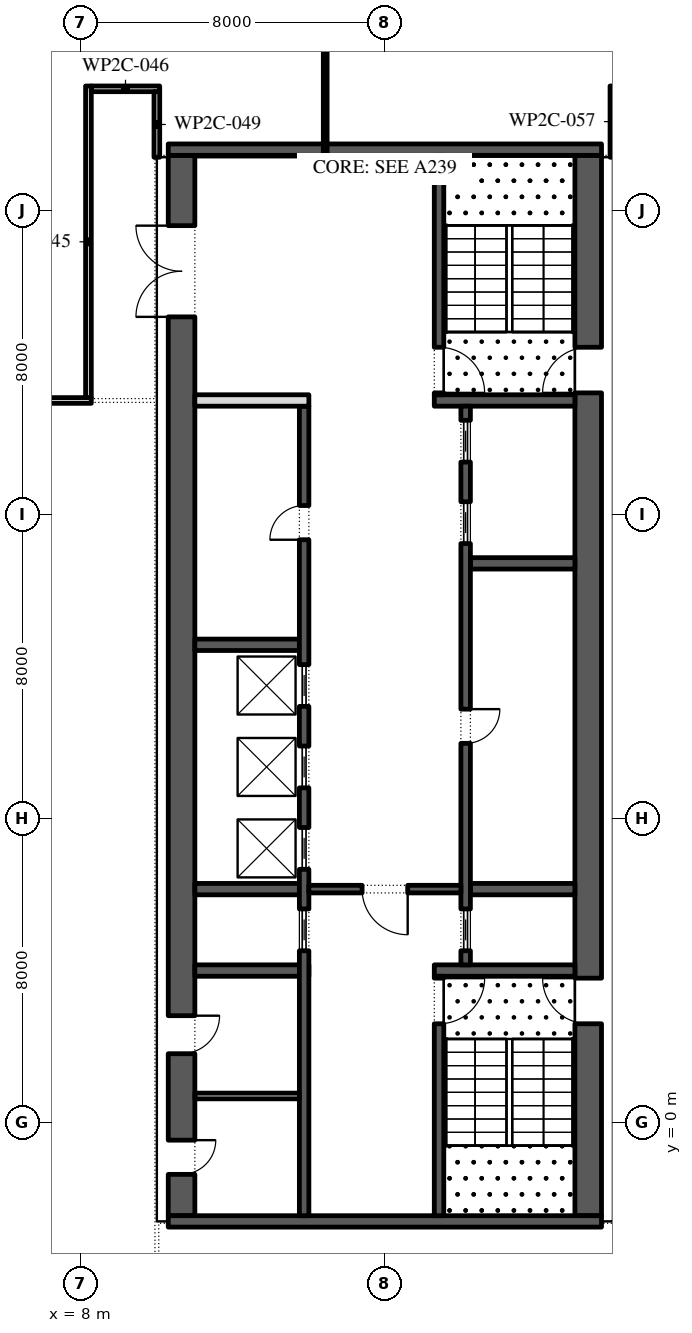
"""IFC4 building model, lengths in metres.
Left out: names, types, materials, properties, quantities, classifications, styles, units other than length and angle.
Written with IfcOpenShell. Run it as: python <this file> out.ifc"""

import sys

from ifc_helpers import new_model, si_unit, direction, frame, frame_2d, origin, place, context, subcontext, project, spatial, rectangle, extrude, element, fill, save


model = new_model("IFC4")
c1 = context("Model", 3, precision=1e-05, world=origin(), true_north=direction((0.0, 1.0)))
c2 = subcontext(c1, "Body", "Model", "MODEL_VIEW")
j1 = project(units=[si_unit("LENGTHUNIT", "METRE"), si_unit("PLANEANGLEUNIT", "RADIAN")], contexts=[c1])
p1 = place(None, origin())
s1 = spatial("IfcSite", under=j1, at=p1, CompositionType="ELEMENT")
p2 = place(p1, origin())
s2 = spatial("IfcBuilding", under=s1, at=p2, CompositionType="ELEMENT")
p3 = place(p2, frame((0.0, 0.0, 165.6)))
s3 = spatial("IfcBuildingStorey", under=s2, at=p3, CompositionType="ELEMENT", Elevation=165.6)
p4 = place(p3, frame((21.35, -2.45, 0.0), z_axis=(0.0, 0.0, 1.0), x_axis=(0.0, 1.0, 0.0)))
e1 = element("IfcWall", 1, at=p4, inside=s3, PredefinedType="SHEAR", context=c2, shape_type="SweptSolid", body=[
    extrude(rectangle(XDim=27.9, YDim=0.7, at=frame_2d((13.95, 0.0))), origin(), (0.0, 0.0, 1.0), 5.8),
])
p5 = place(p4, frame((5.05, 0.0, 0.0)))
e2 = element("IfcOpeningElement", 2, at=p5, cuts=e1, PredefinedType="OPENING", context=c2, shape_type="SweptSolid", body=[
    extrude(rectangle(XDim=1.2, YDim=2.1, at=frame_2d((0.6, 1.05))), frame((0.0, 0.36, 0.0), z_axis=(0.0, -1.0, 0.0), x_axis=(1.0, 0.0, 0.0)), (0.0, 0.0, 1.0), 0.72),
])
p6 = place(p4, frame((21.65, 0.0, 0.0)))
e3 = element("IfcOpeningElement", 3, at=p6, cuts=e1, PredefinedType="OPENING", context=c2, shape_type="SweptSolid", body=[
    extrude(rectangle(XDim=1.2, YDim=2.1, at=frame_2d((0.6, 1.05))), frame((0.0, 0.36, 0.0), z_axis=(0.0, -1.0, 0.0), x_axis=(1.0, 0.0, 0.0)), (0.0, 0.0, 1.0), 0.72),
])
p7 = place(p3, frame((10.65, -2.45, 0.0), z_axis=(0.0, 0.0, 1.0), x_axis=(0.0, 1.0, 0.0)))
e4 = element("IfcWall", 4, at=p7, inside=s3, PredefinedType="SHEAR", context=c2, shape_type="SweptSolid", body=[
    extrude(rectangle(XDim=27.9, YDim=0.7, at=frame_2d((13.95, 0.0))), origin(), (0.0, 0.0, 1.0), 5.8),
])
p8 = place(p7, frame((23.65, 0.0, 0.0)))
e5 = element("IfcOpeningElement", 5, at=p8, cuts=e4, PredefinedType="OPENING", context=c2, shape_type="SweptSolid", body=[
    extrude(rectangle(XDim=2.4, YDim=2.1, at=frame_2d((1.2, 1.05))), frame((0.0, 0.36, 0.0), z_axis=(0.0, -1.0, 0.0), x_axis=(1.0, 0.0, 0.0)), (0.0, 0.0, 1.0), 0.72),
])
p9 = place(p7, frame((1.087, 0.0, 0.0)))
e6 = element("IfcOpeningElement", 6, at=p9, cuts=e4, PredefinedType="OPENING", context=c2, shape_type="SweptSolid", body=[
    extrude(rectangle(XDim=0.9, YDim=2.1, at=frame_2d((0.45, 1.05))), frame((0.0, 0.36, 0.0), z_axis=(0.0, -1.0, 0.0), x_axis=(1.0, 0.0, 0.0)), (0.0, 0.0, 1.0), 0.72),
])
p10 = place(p7, frame((4.262, 0.0, 0.0)))
e7 = element("IfcOpeningElement", 7, at=p10, cuts=e4, PredefinedType="OPENING", context=c2, shape_type="SweptSolid", body=[
    extrude(rectangle(XDim=1.0, YDim=2.1, at=frame_2d((0.5, 1.05))), frame((0.0, 0.36, 0.0), z_axis=(0.0, -1.0, 0.0), x_axis=(1.0, 0.0, 0.0)), (0.0, 0.0, 1.0), 0.72),
])
for number, where, z_axis, x_axis in (
    (8, (10.3, -2.6, 0.0), (0.0, 0.0, 1.0), (1.0, 0.0, 0.0)),
    (9, (10.3, 25.6, 0.0), (0.0, 0.0, 1.0), (1.0, 0.0, 0.0)),
):
    element("IfcWall", number, at=place(p3, frame(where, z_axis=z_axis, x_axis=x_axis)), inside=s3, PredefinedType="SHEAR", context=c2, shape_type="SweptSolid", body=[
        extrude(rectangle(XDim=11.4, YDim=0.3, at=frame_2d((5.7, 0.0))), origin(), (0.0, 0.0, 1.0), 5.8),
    ])
p11 = place(p3, frame((17.3, 4.0, 0.0), z_axis=(0.0, 0.0, 1.0), x_axis=(1.0, 0.0, 0.0)))
e10 = element("IfcWall", 10, at=p11, inside=s3, PredefinedType="SHEAR", context=c2, shape_type="SweptSolid", body=[
    extrude(rectangle(XDim=3.7, YDim=0.3, at=frame_2d((1.85, 0.0))), origin(), (0.0, 0.0, 1.0), 5.8),
])
p12 = place(p3, frame((17.425, -2.45, 0.0), z_axis=(0.0, 0.0, 1.0), x_axis=(0.0, 1.0, 0.0)))
e11 = element("IfcWall", 11, at=p12, inside=s3, PredefinedType="SHEAR", context=c2, shape_type="SweptSolid", body=[
    extrude(rectangle(XDim=6.3, YDim=0.25, at=frame_2d((3.15, 0.0))), origin(), (0.0, 0.0, 1.0), 5.8),
])
p13 = place(p12, frame((5.05, 0.0, 0.0)))
e12 = element("IfcOpeningElement", 12, at=p13, cuts=e11, PredefinedType="OPENING", context=c2, shape_type="SweptSolid", body=[
    extrude(rectangle(XDim=1.2, YDim=2.1, at=frame_2d((0.6, 1.05))), frame((0.0, 0.135, 0.0), z_axis=(0.0, -1.0, 0.0), x_axis=(1.0, 0.0, 0.0)), (0.0, 0.0, 1.0), 0.27),
])
p14 = place(p3, frame((17.3, 19.0, 0.0), z_axis=(0.0, 0.0, 1.0), x_axis=(1.0, 0.0, 0.0)))
e13 = element("IfcWall", 13, at=p14, inside=s3, PredefinedType="SHEAR", context=c2, shape_type="SweptSolid", body=[
    extrude(rectangle(XDim=3.7, YDim=0.3, at=frame_2d((1.85, 0.0))), origin(), (0.0, 0.0, 1.0), 5.8),
])
p15 = place(p3, frame((17.425, 19.15, 0.0), z_axis=(0.0, 0.0, 1.0), x_axis=(0.0, 1.0, 0.0)))
e14 = element("IfcWall", 14, at=p15, inside=s3, PredefinedType="SHEAR", context=c2, shape_type="SweptSolid", body=[
    extrude(rectangle(XDim=6.3, YDim=0.25, at=frame_2d((3.15, 0.0))), origin(), (0.0, 0.0, 1.0), 5.8),
])
p16 = place(p15, frame((0.05, 0.0, 0.0)))
e15 = element("IfcOpeningElement", 15, at=p16, cuts=e14, PredefinedType="OPENING", context=c2, shape_type="SweptSolid", body=[
    extrude(rectangle(XDim=1.2, YDim=2.1, at=frame_2d((0.6, 1.05))), frame((0.0, 0.135, 0.0), z_axis=(0.0, -1.0, 0.0), x_axis=(1.0, 0.0, 0.0)), (0.0, 0.0, 1.0), 0.27),
])
for number, where, z_axis, x_axis in (
    (16, (18.25, 6.143, 0.0), (0.0, 0.0, 1.0), (1.0, 0.0, 0.0)),
    (17, (18.25, 14.714, 0.0), (0.0, 0.0, 1.0), (1.0, 0.0, 0.0)),
):
    element("IfcWall", number, at=place(p3, frame(where, z_axis=z_axis, x_axis=x_axis)), inside=s3, PredefinedType="SHEAR", context=c2, shape_type="SweptSolid", body=[
        extrude(rectangle(XDim=2.75, YDim=0.3, at=frame_2d((1.375, 0.0))), origin(), (0.0, 0.0, 1.0), 5.8),
    ])
p17 = place(p3, frame((18.125, 4.15, 0.0), z_axis=(0.0, 0.0, 1.0), x_axis=(0.0, 1.0, 0.0)))
e18 = element("IfcWall", 18, at=p17, inside=s3, PredefinedType="SHEAR", context=c2, shape_type="SweptSolid", body=[
    extrude(rectangle(XDim=14.7, YDim=0.25, at=frame_2d((7.35, 0.0))), origin(), (0.0, 0.0, 1.0), 5.8),
])
p18 = place(p17, frame((5.829, 0.0, 0.0)))
e19 = element("IfcOpeningElement", 19, at=p18, cuts=e18, PredefinedType="OPENING", context=c2, shape_type="SweptSolid", body=[
    extrude(rectangle(XDim=0.9, YDim=2.1, at=frame_2d((0.45, 1.05))), frame((0.0, 0.135, 0.0), z_axis=(0.0, -1.0, 0.0), x_axis=(1.0, 0.0, 0.0)), (0.0, 0.0, 1.0), 0.27),
])
p19 = place(p17, frame((0.371, 0.0, 0.0)))
e20 = element("IfcOpeningElement", 20, at=p19, cuts=e18, PredefinedType="OPENING", context=c2, shape_type="SweptSolid", body=[
    extrude(rectangle(XDim=1.1, YDim=2.1, at=frame_2d((0.55, 1.05))), frame((0.0, 0.135, 0.0), z_axis=(0.0, -1.0, 0.0), x_axis=(1.0, 0.0, 0.0)), (0.0, 0.0, 1.0), 0.27),
])
p20 = place(p17, frame((11.086, 0.0, 0.0)))
e21 = element("IfcOpeningElement", 21, at=p20, cuts=e18, PredefinedType="OPENING", context=c2, shape_type="SweptSolid", body=[
    extrude(rectangle(XDim=1.1, YDim=2.1, at=frame_2d((0.55, 1.05))), frame((0.0, 0.135, 0.0), z_axis=(0.0, -1.0, 0.0), x_axis=(1.0, 0.0, 0.0)), (0.0, 0.0, 1.0), 0.27),
])
p21 = place(p17, frame((13.229, 0.0, 0.0)))
e22 = element("IfcOpeningElement", 22, at=p21, cuts=e18, PredefinedType="OPENING", context=c2, shape_type="SweptSolid", body=[
    extrude(rectangle(XDim=1.1, YDim=2.1, at=frame_2d((0.55, 1.05))), frame((0.0, 0.135, 0.0), z_axis=(0.0, -1.0, 0.0), x_axis=(1.0, 0.0, 0.0)), (0.0, 0.0, 1.0), 0.27),
])
p22 = place(p3, frame((11.0, 4.0, 0.0), z_axis=(0.0, 0.0, 1.0), x_axis=(1.0, 0.0, 0.0)))
e23 = element("IfcWall", 23, at=p22, inside=s3, PredefinedType="SHEAR", context=c2, shape_type="SweptSolid", body=[
    extrude(rectangle(XDim=3.0, YDim=0.3, at=frame_2d((1.5, 0.0))), origin(), (0.0, 0.0, 1.0), 5.8),
])
for number, where, z_axis, x_axis in (
    (24, (11.0, 6.143, 0.0), (0.0, 0.0, 1.0), (1.0, 0.0, 0.0)),
    (25, (11.0, 12.571, 0.0), (0.0, 0.0, 1.0), (1.0, 0.0, 0.0)),
):
    element("IfcWall", number, at=place(p3, frame(where, z_axis=z_axis, x_axis=x_axis)), inside=s3, PredefinedType="SHEAR", context=c2, shape_type="SweptSolid", body=[
        extrude(rectangle(XDim=2.75, YDim=0.3, at=frame_2d((1.375, 0.0))), origin(), (0.0, 0.0, 1.0), 5.8),
    ])
p23 = place(p3, frame((13.875, -2.45, 0.0), z_axis=(0.0, 0.0, 1.0), x_axis=(0.0, 1.0, 0.0)))
e26 = element("IfcWall", 26, at=p23, inside=s3, PredefinedType="SHEAR", context=c2, shape_type="SweptSolid", body=[
    extrude(rectangle(XDim=21.3, YDim=0.25, at=frame_2d((10.65, 0.0))), origin(), (0.0, 0.0, 1.0), 5.8),
])
p24 = place(p23, frame((17.786, 0.0, 0.0)))
e27 = element("IfcOpeningElement", 27, at=p24, cuts=e26, PredefinedType="OPENING", context=c2, shape_type="SweptSolid", body=[
    extrude(rectangle(XDim=0.9, YDim=2.1, at=frame_2d((0.45, 1.05))), frame((0.0, 0.135, 0.0), z_axis=(0.0, -1.0, 0.0), x_axis=(1.0, 0.0, 0.0)), (0.0, 0.0, 1.0), 0.27),
])
p25 = place(p23, frame((6.971, 0.0, 0.0)))
e28 = element("IfcOpeningElement", 28, at=p25, cuts=e26, PredefinedType="OPENING", context=c2, shape_type="SweptSolid", body=[
    extrude(rectangle(XDim=1.1, YDim=2.1, at=frame_2d((0.55, 1.05))), frame((0.0, 0.135, 0.0), z_axis=(0.0, -1.0, 0.0), x_axis=(1.0, 0.0, 0.0)), (0.0, 0.0, 1.0), 0.27),
])
p26 = place(p23, frame((9.114, 0.0, 0.0)))
e29 = element("IfcOpeningElement", 29, at=p26, cuts=e26, PredefinedType="OPENING", context=c2, shape_type="SweptSolid", body=[
    extrude(rectangle(XDim=1.1, YDim=2.1, at=frame_2d((0.55, 1.05))), frame((0.0, 0.135, 0.0), z_axis=(0.0, -1.0, 0.0), x_axis=(1.0, 0.0, 0.0)), (0.0, 0.0, 1.0), 0.27),
])
p27 = place(p23, frame((11.257, 0.0, 0.0)))
e30 = element("IfcOpeningElement", 30, at=p27, cuts=e26, PredefinedType="OPENING", context=c2, shape_type="SweptSolid", body=[
    extrude(rectangle(XDim=1.1, YDim=2.1, at=frame_2d((0.55, 1.05))), frame((0.0, 0.135, 0.0), z_axis=(0.0, -1.0, 0.0), x_axis=(1.0, 0.0, 0.0)), (0.0, 0.0, 1.0), 0.27),
])
p28 = place(p23, frame((13.4, 0.0, 0.0)))
e31 = element("IfcOpeningElement", 31, at=p28, cuts=e26, PredefinedType="OPENING", context=c2, shape_type="SweptSolid", body=[
    extrude(rectangle(XDim=1.1, YDim=2.1, at=frame_2d((0.55, 1.05))), frame((0.0, 0.135, 0.0), z_axis=(0.0, -1.0, 0.0), x_axis=(1.0, 0.0, 0.0)), (0.0, 0.0, 1.0), 0.27),
])
p29 = place(p3, frame((11.0, 19.0, 0.0), z_axis=(0.0, 0.0, 1.0), x_axis=(1.0, 0.0, 0.0)))
e32 = element("IfcWall", 32, at=p29, inside=s3, PredefinedType="PARTITIONING", context=c2, shape_type="SweptSolid", body=[
    extrude(rectangle(XDim=3.0, YDim=0.3, at=frame_2d((1.5, 0.0))), origin(), (0.0, 0.0, 1.0), 5.8),
])
p30 = place(p3, frame((14.0, 6.143, 0.0), z_axis=(0.0, 0.0, 1.0), x_axis=(1.0, 0.0, 0.0)))
e33 = element("IfcWall", 33, at=p30, inside=s3, PredefinedType="SHEAR", context=c2, shape_type="SweptSolid", body=[
    extrude(rectangle(XDim=4.0, YDim=0.2, at=frame_2d((2.0, 0.0))), origin(), (0.0, 0.0, 1.0), 5.8),
])
p31 = place(p30, frame((1.4, 0.0, 0.0)))
e34 = element("IfcOpeningElement", 34, at=p31, cuts=e33, PredefinedType="OPENING", context=c2, shape_type="SweptSolid", body=[
    extrude(rectangle(XDim=1.2, YDim=2.1, at=frame_2d((0.6, 1.05))), frame((0.0, 0.11, 0.0), z_axis=(0.0, -1.0, 0.0), x_axis=(1.0, 0.0, 0.0)), (0.0, 0.0, 1.0), 0.22),
])
p32 = place(p3, frame((11.0, 0.7, 0.0), z_axis=(0.0, 0.0, 1.0), x_axis=(1.0, 0.0, 0.0)))
e35 = element("IfcWall", 35, at=p32, inside=s3, PredefinedType="PARTITIONING", context=c2, shape_type="SweptSolid", body=[
    extrude(rectangle(XDim=2.75, YDim=0.15, at=frame_2d((1.375, 0.0))), origin(), (0.0, 0.0, 1.0), 5.8),
])
p33 = place(p3, frame((0.915, 19.0, 0.0), z_axis=(0.0, 0.0, 1.0), x_axis=(1.0, 0.0, 0.0)))
e36 = element("IfcWall", 36, at=p33, inside=s3, PredefinedType="PARTITIONING", context=c2, shape_type="SweptSolid", body=[
    extrude(rectangle(XDim=7.36, YDim=0.15, at=frame_2d((3.68, 0.0))), origin(), (0.0, 0.0, 1.0), 5.8),
])
p34 = place(p3, frame((8.2, 19.075, 0.0), z_axis=(0.0, 0.0, 1.0), x_axis=(0.0, 1.0, 0.0)))
e37 = element("IfcWall", 37, at=p34, inside=s3, PredefinedType="PARTITIONING", context=c2, shape_type="SweptSolid", body=[
    extrude(rectangle(XDim=8.2, YDim=0.15, at=frame_2d((4.1, 0.0))), origin(), (0.0, 0.0, 1.0), 5.8),
])
p35 = place(p3, frame((8.275, 27.2, 0.0), z_axis=(0.0, 0.0, 1.0), x_axis=(1.0, 0.0, 0.0)))
e38 = element("IfcWall", 38, at=p35, inside=s3, PredefinedType="PARTITIONING", context=c2, shape_type="SweptSolid", body=[
    extrude(rectangle(XDim=1.8, YDim=0.15, at=frame_2d((0.9, 0.0))), origin(), (0.0, 0.0, 1.0), 5.8),
])
p36 = place(p3, frame((10.0, 27.125, 0.0), z_axis=(0.0, 0.0, 1.0), x_axis=(0.0, -1.0, 0.0)))
e39 = element("IfcWall", 39, at=p36, inside=s3, PredefinedType="PARTITIONING", context=c2, shape_type="SweptSolid", body=[
    extrude(rectangle(XDim=1.725, YDim=0.15, at=frame_2d((0.863, 0.0))), origin(), (0.0, 0.0, 1.0), 5.8),
])
p37 = place(p3, frame((14.43, 31.45, 0.0), z_axis=(0.0, 0.0, 1.0), x_axis=(0.0, -1.0, 0.0)))
e40 = element("IfcWall", 40, at=p37, inside=s3, PredefinedType="PARTITIONING", context=c2, shape_type="SweptSolid", body=[
    extrude(rectangle(XDim=6.05, YDim=0.1, at=frame_2d((3.025, 0.0))), origin(), (0.0, 0.0, 1.0), 5.8),
])
p38 = place(p3, frame((22.0, 25.4, 0.0), z_axis=(0.0, 0.0, 1.0), x_axis=(0.0, 1.0, 0.0)))
e41 = element("IfcWall", 41, at=p38, inside=s3, PredefinedType="PARTITIONING", context=c2, shape_type="SweptSolid", body=[
    extrude(rectangle(XDim=1.875, YDim=0.15, at=frame_2d((0.938, 0.0))), origin(), (0.0, 0.0, 1.0), 5.8),
])
p39 = place(p18, frame((0.9, -0.2, 0.0), z_axis=(0.0, 0.0, 1.0), x_axis=(-1.0, 0.0, 0.0)))
e42 = element("IfcDoor", 42, at=p39, inside=s3, OperationType="SINGLE_SWING_RIGHT", PredefinedType="DOOR", context=c2, shape_type="SweptSolid", body=[
    extrude(rectangle(XDim=0.9, YDim=2.1, at=frame_2d((0.45, 1.05))), frame((0.0, -0.075, 0.0), z_axis=(0.0, -1.0, 0.0), x_axis=(1.0, 0.0, 0.0)), (0.0, 0.0, 1.0), 0.05),
])
fill(e19, e42)
p40 = place(p19, origin())
e43 = element("IfcDoor", 43, at=p40, inside=s3, OperationType="SLIDING_TO_LEFT", PredefinedType="DOOR", context=c2, shape_type="SweptSolid", body=[
    extrude(rectangle(XDim=1.1, YDim=2.1, at=frame_2d((0.55, 1.05))), frame((0.0, 0.025, 0.0), z_axis=(0.0, -1.0, 0.0), x_axis=(1.0, 0.0, 0.0)), (0.0, 0.0, 1.0), 0.05),
])
fill(e20, e43)
p41 = place(p20, origin())
e44 = element("IfcDoor", 44, at=p41, inside=s3, OperationType="SLIDING_TO_LEFT", PredefinedType="DOOR", context=c2, shape_type="SweptSolid", body=[
    extrude(rectangle(XDim=1.1, YDim=2.1, at=frame_2d((0.55, 1.05))), frame((0.0, 0.025, 0.0), z_axis=(0.0, -1.0, 0.0), x_axis=(1.0, 0.0, 0.0)), (0.0, 0.0, 1.0), 0.05),
])
fill(e21, e44)
p42 = place(p21, origin())
e45 = element("IfcDoor", 45, at=p42, inside=s3, OperationType="SLIDING_TO_LEFT", PredefinedType="DOOR", context=c2, shape_type="SweptSolid", body=[
    extrude(rectangle(XDim=1.1, YDim=2.1, at=frame_2d((0.55, 1.05))), frame((0.0, 0.025, 0.0), z_axis=(0.0, -1.0, 0.0), x_axis=(1.0, 0.0, 0.0)), (0.0, 0.0, 1.0), 0.05),
])
fill(e22, e45)
p43 = place(p24, origin())
e46 = element("IfcDoor", 46, at=p43, inside=s3, OperationType="SINGLE_SWING_RIGHT", PredefinedType="DOOR", context=c2, shape_type="SweptSolid", body=[
    extrude(rectangle(XDim=0.9, YDim=2.1, at=frame_2d((0.45, 1.05))), frame((0.0, 0.125, 0.0), z_axis=(0.0, -1.0, 0.0), x_axis=(1.0, 0.0, 0.0)), (0.0, 0.0, 1.0), 0.05),
])
fill(e27, e46)
p44 = place(p25, origin())
e47 = element("IfcDoor", 47, at=p44, inside=s3, OperationType="SLIDING_TO_LEFT", PredefinedType="DOOR", context=c2, shape_type="SweptSolid", body=[
    extrude(rectangle(XDim=1.1, YDim=2.1, at=frame_2d((0.55, 1.05))), frame((0.0, 0.025, 0.0), z_axis=(0.0, -1.0, 0.0), x_axis=(1.0, 0.0, 0.0)), (0.0, 0.0, 1.0), 0.05),
])
fill(e28, e47)
p45 = place(p26, origin())
e48 = element("IfcDoor", 48, at=p45, inside=s3, OperationType="SLIDING_TO_LEFT", PredefinedType="DOOR", context=c2, shape_type="SweptSolid", body=[
    extrude(rectangle(XDim=1.1, YDim=2.1, at=frame_2d((0.55, 1.05))), frame((0.0, 0.025, 0.0), z_axis=(0.0, -1.0, 0.0), x_axis=(1.0, 0.0, 0.0)), (0.0, 0.0, 1.0), 0.05),
])
fill(e29, e48)
p46 = place(p27, origin())
e49 = element("IfcDoor", 49, at=p46, inside=s3, OperationType="SLIDING_TO_LEFT", PredefinedType="DOOR", context=c2, shape_type="SweptSolid", body=[
    extrude(rectangle(XDim=1.1, YDim=2.1, at=frame_2d((0.55, 1.05))), frame((0.0, 0.025, 0.0), z_axis=(0.0, -1.0, 0.0), x_axis=(1.0, 0.0, 0.0)), (0.0, 0.0, 1.0), 0.05),
])
fill(e30, e49)
p47 = place(p28, origin())
e50 = element("IfcDoor", 50, at=p47, inside=s3, OperationType="SLIDING_TO_LEFT", PredefinedType="DOOR", context=c2, shape_type="SweptSolid", body=[
    extrude(rectangle(XDim=1.1, YDim=2.1, at=frame_2d((0.55, 1.05))), frame((0.0, 0.025, 0.0), z_axis=(0.0, -1.0, 0.0), x_axis=(1.0, 0.0, 0.0)), (0.0, 0.0, 1.0), 0.05),
])
fill(e31, e50)
p48 = place(p31, frame((1.2, 0.0, 0.0), z_axis=(0.0, 0.0, 1.0), x_axis=(-1.0, 0.0, 0.0)))
e51 = element("IfcDoor", 51, at=p48, inside=s3, OperationType="SINGLE_SWING_RIGHT", PredefinedType="DOOR", context=c2, shape_type="SweptSolid", body=[
    extrude(rectangle(XDim=1.2, YDim=2.1, at=frame_2d((0.6, 1.05))), frame((0.0, 0.025, 0.0), z_axis=(0.0, -1.0, 0.0), x_axis=(1.0, 0.0, 0.0)), (0.0, 0.0, 1.0), 0.05),
])
fill(e34, e51)
p49 = place(p8, origin())
e52 = element("IfcDoor", 52, at=p49, inside=s3, OperationType="DOUBLE_DOOR_SINGLE_SWING", PredefinedType="DOOR", context=c2, shape_type="SweptSolid", body=[
    extrude(rectangle(XDim=2.4, YDim=2.1, at=frame_2d((1.2, 1.05))), frame((0.0, 0.025, 0.0), z_axis=(0.0, -1.0, 0.0), x_axis=(1.0, 0.0, 0.0)), (0.0, 0.0, 1.0), 0.05),
])
fill(e5, e52)
p50 = place(p13, frame((1.2, 0.0, 0.0), z_axis=(0.0, 0.0, 1.0), x_axis=(-1.0, 0.0, 0.0)))
e53 = element("IfcDoor", 53, at=p50, inside=s3, OperationType="SINGLE_SWING_RIGHT", PredefinedType="DOOR", context=c2, shape_type="SweptSolid", body=[
    extrude(rectangle(XDim=1.2, YDim=2.1, at=frame_2d((0.6, 1.05))), frame((0.0, 0.025, 0.0), z_axis=(0.0, -1.0, 0.0), x_axis=(1.0, 0.0, 0.0)), (0.0, 0.0, 1.0), 0.05),
])
fill(e12, e53)
p51 = place(p5, origin())
e54 = element("IfcDoor", 54, at=p51, inside=s3, OperationType="SINGLE_SWING_LEFT", PredefinedType="DOOR", context=c2, shape_type="SweptSolid", body=[
    extrude(rectangle(XDim=1.2, YDim=2.1, at=frame_2d((0.6, 1.05))), frame((0.0, 0.025, 0.0), z_axis=(0.0, -1.0, 0.0), x_axis=(1.0, 0.0, 0.0)), (0.0, 0.0, 1.0), 0.05),
])
fill(e2, e54)
p52 = place(p16, frame((1.2, 0.0, 0.0), z_axis=(0.0, 0.0, 1.0), x_axis=(-1.0, 0.0, 0.0)))
e55 = element("IfcDoor", 55, at=p52, inside=s3, OperationType="SINGLE_SWING_LEFT", PredefinedType="DOOR", context=c2, shape_type="SweptSolid", body=[
    extrude(rectangle(XDim=1.2, YDim=2.1, at=frame_2d((0.6, 1.05))), frame((0.0, 0.025, 0.0), z_axis=(0.0, -1.0, 0.0), x_axis=(1.0, 0.0, 0.0)), (0.0, 0.0, 1.0), 0.05),
])
fill(e15, e55)
p53 = place(p6, origin())
e56 = element("IfcDoor", 56, at=p53, inside=s3, OperationType="SINGLE_SWING_RIGHT", PredefinedType="DOOR", context=c2, shape_type="SweptSolid", body=[
    extrude(rectangle(XDim=1.2, YDim=2.1, at=frame_2d((0.6, 1.05))), frame((0.0, 0.025, 0.0), z_axis=(0.0, -1.0, 0.0), x_axis=(1.0, 0.0, 0.0)), (0.0, 0.0, 1.0), 0.05),
])
fill(e3, e56)
p54 = place(p9, frame((0.9, -0.65, 0.0), z_axis=(0.0, 0.0, 1.0), x_axis=(-1.0, 0.0, 0.0)))
e57 = element("IfcDoor", 57, at=p54, inside=s3, OperationType="SINGLE_SWING_RIGHT", PredefinedType="DOOR", context=c2, shape_type="SweptSolid", body=[
    extrude(rectangle(XDim=0.9, YDim=2.1, at=frame_2d((0.45, 1.05))), frame((0.0, -0.3, 0.0), z_axis=(0.0, -1.0, 0.0), x_axis=(1.0, 0.0, 0.0)), (0.0, 0.0, 1.0), 0.05),
])
fill(e6, e57)
p55 = place(p10, frame((1.0, -0.65, 0.0), z_axis=(0.0, 0.0, 1.0), x_axis=(-1.0, 0.0, 0.0)))
e58 = element("IfcDoor", 58, at=p55, inside=s3, OperationType="SINGLE_SWING_RIGHT", PredefinedType="DOOR", context=c2, shape_type="SweptSolid", body=[
    extrude(rectangle(XDim=1.0, YDim=2.1, at=frame_2d((0.5, 1.05))), frame((0.0, -0.3, 0.0), z_axis=(0.0, -1.0, 0.0), x_axis=(1.0, 0.0, 0.0)), (0.0, 0.0, 1.0), 0.05),
])
fill(e7, e58)
save(model, sys.argv[1])
